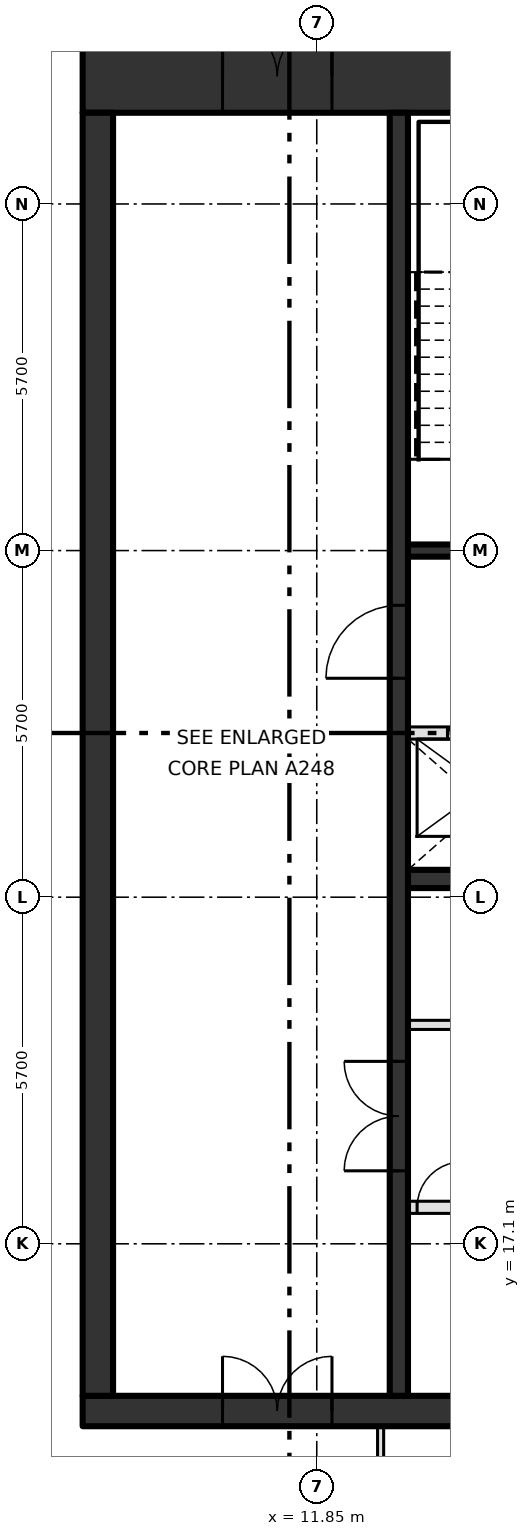
"""IFC4 building model, lengths in metres.
Left out: names, types, materials, properties, quantities, classifications, styles, units other than length and angle.
Written with IfcOpenShell. Run it as: python <this file> out.ifc"""

import sys

from ifc_helpers import new_model, si_unit, direction, frame, frame_2d, origin, place, context, subcontext, project, spatial, rectangle, extrude, element, fill, save


model = new_model("IFC4")
c1 = context("Model", 3, precision=1e-05, world=origin(), true_north=direction((0.0, 1.0)))
c2 = subcontext(c1, "Body", "Model", "MODEL_VIEW")
j1 = project(units=[si_unit("LENGTHUNIT", "METRE"), si_unit("PLANEANGLEUNIT", "RADIAN")], contexts=[c1])
p1 = place(None, origin())
s1 = spatial("IfcSite", under=j1, at=p1, CompositionType="ELEMENT")
p2 = place(p1, origin())
s2 = spatial("IfcBuilding", under=s1, at=p2, CompositionType="ELEMENT")
p3 = place(p2, frame((0.0, 0.0, 370.8)))
s3 = spatial("IfcBuildingStorey", under=s2, at=p3, CompositionType="ELEMENT", Elevation=370.8)
p4 = place(p3, frame((8.0, 14.35, -0.3), z_axis=(0.0, 0.0, 1.0), x_axis=(1.0, 0.0, 0.0)))
e1 = element("IfcWall", 1, at=p4, inside=s3, PredefinedType="SHEAR", context=c2, shape_type="SweptSolid", body=[
    extrude(rectangle(XDim=22.8, YDim=0.5, at=frame_2d((11.4, 0.0))), origin(), (0.0, 0.0, 1.0), 4.2),
])
p5 = place(p4, frame((2.3, 0.0, 0.3)))
e2 = element("IfcOpeningElement", 2, at=p5, cuts=e1, PredefinedType="OPENING", context=c2, shape_type="SweptSolid", body=[
    extrude(rectangle(XDim=1.8, YDim=2.1, at=frame_2d((0.9, 1.05))), frame((0.0, 0.26, 0.0), z_axis=(0.0, -1.0, 0.0), x_axis=(1.0, 0.0, 0.0)), (0.0, 0.0, 1.0), 0.52),
])
p6 = place(p3, frame((8.0, 36.3, -0.3), z_axis=(0.0, 0.0, 1.0), x_axis=(1.0, 0.0, 0.0)))
e3 = element("IfcWall", 3, at=p6, inside=s3, PredefinedType="SHEAR", context=c2, shape_type="SweptSolid", body=[
    extrude(rectangle(XDim=22.8, YDim=1.2, at=frame_2d((11.4, 0.0))), origin(), (0.0, 0.0, 1.0), 4.2),
])
p7 = place(p6, frame((2.3, 0.0, 0.3)))
e4 = element("IfcOpeningElement", 4, at=p7, cuts=e3, PredefinedType="OPENING", context=c2, shape_type="SweptSolid", body=[
    extrude(rectangle(XDim=1.8, YDim=2.1, at=frame_2d((0.9, 1.05))), frame((0.0, 0.61, 0.0), z_axis=(0.0, -1.0, 0.0), x_axis=(1.0, 0.0, 0.0)), (0.0, 0.0, 1.0), 1.22),
])
p8 = place(p3, frame((8.25, 14.6, -0.3), z_axis=(0.0, 0.0, 1.0), x_axis=(0.0, 1.0, 0.0)))
e5 = element("IfcWall", 5, at=p8, inside=s3, PredefinedType="SHEAR", context=c2, shape_type="SweptSolid", body=[
    extrude(rectangle(XDim=21.1, YDim=0.5, at=frame_2d((10.55, 0.0))), origin(), (0.0, 0.0, 1.0), 4.2),
])
p9 = place(p3, frame((13.35, 17.7, 0.0), z_axis=(0.0, 0.0, 1.0), x_axis=(1.0, 0.0, 0.0)))
e6 = element("IfcWall", 6, at=p9, inside=s3, PredefinedType="SOLIDWALL", context=c2, shape_type="SweptSolid", body=[
    extrude(rectangle(XDim=13.425, YDim=0.2, at=frame_2d((6.712, 0.0))), origin(), (0.0, 0.0, 1.0), 3.9),
])
p10 = place(p9, frame((2.0, 0.0, 0.0)))
e7 = element("IfcOpeningElement", 7, at=p10, cuts=e6, PredefinedType="OPENING", context=c2, shape_type="SweptSolid", body=[
    extrude(rectangle(XDim=1.1, YDim=2.1, at=frame_2d((0.55, 1.05))), frame((0.0, 0.11, 0.0), z_axis=(0.0, -1.0, 0.0), x_axis=(1.0, 0.0, 0.0)), (0.0, 0.0, 1.0), 0.22),
])
p11 = place(p9, frame((4.7, 0.0, 0.0)))
e8 = element("IfcOpeningElement", 8, at=p11, cuts=e6, PredefinedType="OPENING", context=c2, shape_type="SweptSolid", body=[
    extrude(rectangle(XDim=1.1, YDim=2.1, at=frame_2d((0.55, 1.05))), frame((0.0, 0.11, 0.0), z_axis=(0.0, -1.0, 0.0), x_axis=(1.0, 0.0, 0.0)), (0.0, 0.0, 1.0), 0.22),
])
p12 = place(p9, frame((7.4, 0.0, 0.0)))
e9 = element("IfcOpeningElement", 9, at=p12, cuts=e6, PredefinedType="OPENING", context=c2, shape_type="SweptSolid", body=[
    extrude(rectangle(XDim=1.1, YDim=2.1, at=frame_2d((0.55, 1.05))), frame((0.0, 0.11, 0.0), z_axis=(0.0, -1.0, 0.0), x_axis=(1.0, 0.0, 0.0)), (0.0, 0.0, 1.0), 0.22),
])
p13 = place(p9, frame((10.1, 0.0, 0.0)))
e10 = element("IfcOpeningElement", 10, at=p13, cuts=e6, PredefinedType="OPENING", context=c2, shape_type="SweptSolid", body=[
    extrude(rectangle(XDim=1.1, YDim=2.1, at=frame_2d((0.55, 1.05))), frame((0.0, 0.11, 0.0), z_axis=(0.0, -1.0, 0.0), x_axis=(1.0, 0.0, 0.0)), (0.0, 0.0, 1.0), 0.22),
])
p14 = place(p9, frame((0.15, 0.0, 0.0)))
e11 = element("IfcOpeningElement", 11, at=p14, cuts=e6, PredefinedType="OPENING", context=c2, shape_type="SweptSolid", body=[
    extrude(rectangle(XDim=0.75, YDim=2.1, at=frame_2d((0.375, 1.05))), frame((0.0, 0.11, 0.0), z_axis=(0.0, -1.0, 0.0), x_axis=(1.0, 0.0, 0.0)), (0.0, 0.0, 1.0), 0.22),
])
p15 = place(p9, frame((12.3, 0.0, 0.0)))
e12 = element("IfcOpeningElement", 12, at=p15, cuts=e6, PredefinedType="OPENING", context=c2, shape_type="SweptSolid", body=[
    extrude(rectangle(XDim=0.75, YDim=2.1, at=frame_2d((0.375, 1.05))), frame((0.0, 0.11, 0.0), z_axis=(0.0, -1.0, 0.0), x_axis=(1.0, 0.0, 0.0)), (0.0, 0.0, 1.0), 0.22),
])
p16 = place(p3, frame((13.35, 20.7, 0.0), z_axis=(0.0, 0.0, 1.0), x_axis=(1.0, 0.0, 0.0)))
e13 = element("IfcWall", 13, at=p16, inside=s3, PredefinedType="PARTITIONING", context=c2, shape_type="SweptSolid", body=[
    extrude(rectangle(XDim=13.425, YDim=0.15, at=frame_2d((6.712, 0.0))), origin(), (0.0, 0.0, 1.0), 3.9),
])
p17 = place(p16, frame((3.45, 0.0, 0.0)))
e14 = element("IfcOpeningElement", 14, at=p17, cuts=e13, PredefinedType="OPENING", context=c2, shape_type="SweptSolid", body=[
    extrude(rectangle(XDim=0.9, YDim=2.1, at=frame_2d((0.45, 1.05))), frame((0.0, 0.085, 0.0), z_axis=(0.0, -1.0, 0.0), x_axis=(1.0, 0.0, 0.0)), (0.0, 0.0, 1.0), 0.17),
])
p18 = place(p16, frame((10.2, 0.0, 0.0)))
e15 = element("IfcOpeningElement", 15, at=p18, cuts=e13, PredefinedType="OPENING", context=c2, shape_type="SweptSolid", body=[
    extrude(rectangle(XDim=0.9, YDim=2.1, at=frame_2d((0.45, 1.05))), frame((0.0, 0.085, 0.0), z_axis=(0.0, -1.0, 0.0), x_axis=(1.0, 0.0, 0.0)), (0.0, 0.0, 1.0), 0.17),
])
p19 = place(p3, frame((13.35, 23.1, 0.0), z_axis=(0.0, 0.0, 1.0), x_axis=(1.0, 0.0, 0.0)))
e16 = element("IfcWall", 16, at=p19, inside=s3, PredefinedType="SHEAR", context=c2, shape_type="SweptSolid", body=[
    extrude(rectangle(XDim=16.95, YDim=0.3, at=frame_2d((8.475, 0.0))), origin(), (0.0, 0.0, 1.0), 3.9),
])
p20 = place(p3, frame((13.35, 25.5, 0.0), z_axis=(0.0, 0.0, 1.0), x_axis=(1.0, 0.0, 0.0)))
e17 = element("IfcWall", 17, at=p20, inside=s3, PredefinedType="SOLIDWALL", context=c2, shape_type="SweptSolid", body=[
    extrude(rectangle(XDim=16.95, YDim=0.2, at=frame_2d((8.475, 0.0))), origin(), (0.0, 0.0, 1.0), 3.9),
])
p21 = place(p20, frame((0.65, 0.0, 0.0)))
e18 = element("IfcOpeningElement", 18, at=p21, cuts=e17, PredefinedType="OPENING", context=c2, shape_type="SweptSolid", body=[
    extrude(rectangle(XDim=1.1, YDim=2.1, at=frame_2d((0.55, 1.05))), frame((0.0, 0.11, 0.0), z_axis=(0.0, -1.0, 0.0), x_axis=(1.0, 0.0, 0.0)), (0.0, 0.0, 1.0), 0.22),
])
p22 = place(p20, frame((3.35, 0.0, 0.0)))
e19 = element("IfcOpeningElement", 19, at=p22, cuts=e17, PredefinedType="OPENING", context=c2, shape_type="SweptSolid", body=[
    extrude(rectangle(XDim=1.1, YDim=2.1, at=frame_2d((0.55, 1.05))), frame((0.0, 0.11, 0.0), z_axis=(0.0, -1.0, 0.0), x_axis=(1.0, 0.0, 0.0)), (0.0, 0.0, 1.0), 0.22),
])
p23 = place(p20, frame((6.05, 0.0, 0.0)))
e20 = element("IfcOpeningElement", 20, at=p23, cuts=e17, PredefinedType="OPENING", context=c2, shape_type="SweptSolid", body=[
    extrude(rectangle(XDim=1.1, YDim=2.1, at=frame_2d((0.55, 1.05))), frame((0.0, 0.11, 0.0), z_axis=(0.0, -1.0, 0.0), x_axis=(1.0, 0.0, 0.0)), (0.0, 0.0, 1.0), 0.22),
])
p24 = place(p20, frame((8.75, 0.0, 0.0)))
e21 = element("IfcOpeningElement", 21, at=p24, cuts=e17, PredefinedType="OPENING", context=c2, shape_type="SweptSolid", body=[
    extrude(rectangle(XDim=1.1, YDim=2.1, at=frame_2d((0.55, 1.05))), frame((0.0, 0.11, 0.0), z_axis=(0.0, -1.0, 0.0), x_axis=(1.0, 0.0, 0.0)), (0.0, 0.0, 1.0), 0.22),
])
p25 = place(p20, frame((13.0, 0.0, 0.0)))
e22 = element("IfcOpeningElement", 22, at=p25, cuts=e17, PredefinedType="OPENING", context=c2, shape_type="SweptSolid", body=[
    extrude(rectangle(XDim=0.9, YDim=2.1, at=frame_2d((0.45, 1.05))), frame((0.0, 0.11, 0.0), z_axis=(0.0, -1.0, 0.0), x_axis=(1.0, 0.0, 0.0)), (0.0, 0.0, 1.0), 0.22),
])
p26 = place(p3, frame((13.35, 28.5, 0.0), z_axis=(0.0, 0.0, 1.0), x_axis=(1.0, 0.0, 0.0)))
e23 = element("IfcWall", 23, at=p26, inside=s3, PredefinedType="SOLIDWALL", context=c2, shape_type="SweptSolid", body=[
    extrude(rectangle(XDim=6.75, YDim=0.2, at=frame_2d((3.375, 0.0))), origin(), (0.0, 0.0, 1.0), 3.9),
])
p27 = place(p26, frame((0.95, 0.0, 0.0)))
e24 = element("IfcOpeningElement", 24, at=p27, cuts=e23, PredefinedType="OPENING", context=c2, shape_type="SweptSolid", body=[
    extrude(rectangle(XDim=1.2, YDim=2.1, at=frame_2d((0.6, 1.05))), frame((0.0, 0.11, 0.0), z_axis=(0.0, -1.0, 0.0), x_axis=(1.0, 0.0, 0.0)), (0.0, 0.0, 1.0), 0.22),
])
p28 = place(p26, frame((3.75, 0.0, 0.0)))
e25 = element("IfcOpeningElement", 25, at=p28, cuts=e23, PredefinedType="OPENING", context=c2, shape_type="SweptSolid", body=[
    extrude(rectangle(XDim=1.1, YDim=2.1, at=frame_2d((0.55, 1.05))), frame((0.0, 0.11, 0.0), z_axis=(0.0, -1.0, 0.0), x_axis=(1.0, 0.0, 0.0)), (0.0, 0.0, 1.0), 0.22),
])
p29 = place(p3, frame((13.2, 14.6, 0.0), z_axis=(0.0, 0.0, 1.0), x_axis=(0.0, 1.0, 0.0)))
e26 = element("IfcWall", 26, at=p29, inside=s3, PredefinedType="SHEAR", context=c2, shape_type="SweptSolid", body=[
    extrude(rectangle(XDim=21.1, YDim=0.3, at=frame_2d((10.55, 0.0))), origin(), (0.0, 0.0, 1.0), 3.9),
])
p30 = place(p29, frame((3.7, 0.0, 0.0)))
e27 = element("IfcOpeningElement", 27, at=p30, cuts=e26, PredefinedType="OPENING", context=c2, shape_type="SweptSolid", body=[
    extrude(rectangle(XDim=1.8, YDim=2.1, at=frame_2d((0.9, 1.05))), frame((0.0, 0.16, 0.0), z_axis=(0.0, -1.0, 0.0), x_axis=(1.0, 0.0, 0.0)), (0.0, 0.0, 1.0), 0.32),
])
p31 = place(p29, frame((11.8, 0.0, 0.0)))
e28 = element("IfcOpeningElement", 28, at=p31, cuts=e26, PredefinedType="OPENING", context=c2, shape_type="SweptSolid", body=[
    extrude(rectangle(XDim=1.2, YDim=2.1, at=frame_2d((0.6, 1.05))), frame((0.0, 0.16, 0.0), z_axis=(0.0, -1.0, 0.0), x_axis=(1.0, 0.0, 0.0)), (0.0, 0.0, 1.0), 0.32),
])
p32 = place(p3, frame((12.9, 10.078, 0.0), z_axis=(0.0, 0.0, 1.0), x_axis=(0.0, 1.0, 0.0)))
e29 = element("IfcWall", 29, at=p32, inside=s3, PredefinedType="PARTITIONING", context=c2, shape_type="SweptSolid", body=[
    extrude(rectangle(XDim=4.022, YDim=0.1, at=frame_2d((2.011, 0.0))), origin(), (0.0, 0.0, 1.0), 3.9),
])
p33 = place(p21, origin())
e30 = element("IfcDoor", 30, at=p33, inside=s3, OperationType="SLIDING_TO_LEFT", PredefinedType="DOOR", context=c2, shape_type="SweptSolid", body=[
    extrude(rectangle(XDim=1.1, YDim=2.1, at=frame_2d((0.55, 1.05))), frame((0.0, 0.025, 0.0), z_axis=(0.0, -1.0, 0.0), x_axis=(1.0, 0.0, 0.0)), (0.0, 0.0, 1.0), 0.05),
])
fill(e18, e30)
p34 = place(p14, origin())
e31 = element("IfcDoor", 31, at=p34, inside=s3, OperationType="SINGLE_SWING_RIGHT", PredefinedType="DOOR", context=c2, shape_type="SweptSolid", body=[
    extrude(rectangle(XDim=0.75, YDim=2.1, at=frame_2d((0.375, 1.05))), frame((0.0, 0.025, 0.0), z_axis=(0.0, -1.0, 0.0), x_axis=(1.0, 0.0, 0.0)), (0.0, 0.0, 1.0), 0.05),
])
fill(e11, e31)
p35 = place(p30, origin())
e32 = element("IfcDoor", 32, at=p35, inside=s3, OperationType="DOUBLE_DOOR_SINGLE_SWING", PredefinedType="DOOR", context=c2, shape_type="SweptSolid", body=[
    extrude(rectangle(XDim=1.8, YDim=2.1, at=frame_2d((0.9, 1.05))), frame((0.0, 0.025, 0.0), z_axis=(0.0, -1.0, 0.0), x_axis=(1.0, 0.0, 0.0)), (0.0, 0.0, 1.0), 0.05),
])
fill(e27, e32)
p36 = place(p31, origin())
e33 = element("IfcDoor", 33, at=p36, inside=s3, OperationType="SINGLE_SWING_LEFT", PredefinedType="DOOR", context=c2, shape_type="SweptSolid", body=[
    extrude(rectangle(XDim=1.2, YDim=2.1, at=frame_2d((0.6, 1.05))), frame((0.0, 0.025, 0.0), z_axis=(0.0, -1.0, 0.0), x_axis=(1.0, 0.0, 0.0)), (0.0, 0.0, 1.0), 0.05),
])
fill(e28, e33)
p37 = place(p7, origin())
e34 = element("IfcDoor", 34, at=p37, inside=s3, OperationType="DOUBLE_DOOR_SINGLE_SWING", PredefinedType="DOOR", context=c2, shape_type="SweptSolid", body=[
    extrude(rectangle(XDim=1.8, YDim=2.1, at=frame_2d((0.9, 1.05))), frame((0.0, 0.025, 0.0), z_axis=(0.0, -1.0, 0.0), x_axis=(1.0, 0.0, 0.0)), (0.0, 0.0, 1.0), 0.05),
])
fill(e4, e34)
p38 = place(p5, origin())
e35 = element("IfcDoor", 35, at=p38, inside=s3, OperationType="DOUBLE_DOOR_SINGLE_SWING", PredefinedType="DOOR", context=c2, shape_type="SweptSolid", body=[
    extrude(rectangle(XDim=1.8, YDim=2.1, at=frame_2d((0.9, 1.05))), frame((0.0, 0.025, 0.0), z_axis=(0.0, -1.0, 0.0), x_axis=(1.0, 0.0, 0.0)), (0.0, 0.0, 1.0), 0.05),
])
fill(e2, e35)
save(model, sys.argv[1])
